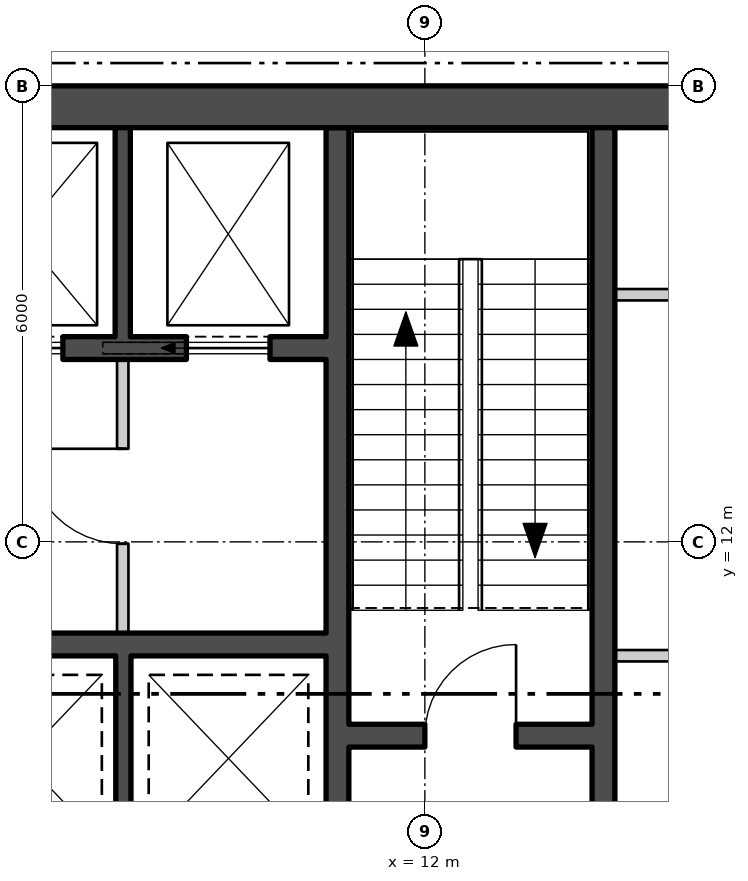
"""IFC4 building model, lengths in metres.
Left out: names, types, materials, properties, quantities, classifications, styles, units other than length and angle.
Written with IfcOpenShell. Run it as: python <this file> out.ifc"""

import sys

from ifc_helpers import new_model, si_unit, direction, frame, frame_2d, origin, place, context, subcontext, project, spatial, polyline, rectangle, outline, extrude, element, fill, save


model = new_model("IFC4")
c1 = context("Model", 3, precision=1e-05, world=origin(), true_north=direction((0.0, 1.0)))
c2 = subcontext(c1, "Body", "Model", "MODEL_VIEW")
j1 = project(units=[si_unit("LENGTHUNIT", "METRE"), si_unit("PLANEANGLEUNIT", "RADIAN")], contexts=[c1])
p1 = place(None, origin())
s1 = spatial("IfcSite", under=j1, at=p1, CompositionType="ELEMENT")
p2 = place(p1, origin())
s2 = spatial("IfcBuilding", under=s1, at=p2, CompositionType="ELEMENT")
p3 = place(p2, frame((0.0, 0.0, 124.8)))
s3 = spatial("IfcBuildingStorey", under=s2, at=p3, CompositionType="ELEMENT", Elevation=124.8)
p4 = place(p3, frame((4.58, -27.57, -0.18), z_axis=(0.0, 0.0, 1.0), x_axis=(0.500000711659, 0.866024992908, 0.0)))
e1 = element("IfcWall", 1, at=p4, inside=s3, PredefinedType="SOLIDWALL", context=c2, shape_type="SweptSolid", body=[
    extrude(outline(polyline([(-0.13, -0.225), (45.87, -0.225), (45.61, 0.225), (0.13, 0.225), (-0.13, -0.225)])), origin(), (0.0, 0.0, 1.0), 4.28),
])
p5 = place(p4, frame((1.424, 0.0, 1.08)))
e2 = element("IfcOpeningElement", 2, at=p5, cuts=e1, PredefinedType="OPENING", context=c2, shape_type="SweptSolid", body=[
    extrude(rectangle(XDim=2.4, YDim=2.6, at=frame_2d((1.2, 1.3))), frame((0.0, 0.235, 0.0), z_axis=(0.0, -1.0, 0.0), x_axis=(1.0, 0.0, 0.0)), (0.0, 0.0, 1.0), 0.47),
])
p6 = place(p4, frame((5.893, 0.0, 1.08)))
e3 = element("IfcOpeningElement", 3, at=p6, cuts=e1, PredefinedType="OPENING", context=c2, shape_type="SweptSolid", body=[
    extrude(rectangle(XDim=2.4, YDim=2.6, at=frame_2d((1.2, 1.3))), frame((0.0, 0.235, 0.0), z_axis=(0.0, -1.0, 0.0), x_axis=(1.0, 0.0, 0.0)), (0.0, 0.0, 1.0), 0.47),
])
p7 = place(p4, frame((10.401, 0.0, 1.08)))
e4 = element("IfcOpeningElement", 4, at=p7, cuts=e1, PredefinedType="OPENING", context=c2, shape_type="SweptSolid", body=[
    extrude(rectangle(XDim=2.4, YDim=2.6, at=frame_2d((1.2, 1.3))), frame((0.0, 0.235, 0.0), z_axis=(0.0, -1.0, 0.0), x_axis=(1.0, 0.0, 0.0)), (0.0, 0.0, 1.0), 0.47),
])
p8 = place(p4, frame((14.909, 0.0, 1.08)))
e5 = element("IfcOpeningElement", 5, at=p8, cuts=e1, PredefinedType="OPENING", context=c2, shape_type="SweptSolid", body=[
    extrude(rectangle(XDim=2.4, YDim=2.6, at=frame_2d((1.2, 1.3))), frame((0.0, 0.235, 0.0), z_axis=(0.0, -1.0, 0.0), x_axis=(1.0, 0.0, 0.0)), (0.0, 0.0, 1.0), 0.47),
])
p9 = place(p4, frame((19.416, 0.0, 1.08)))
e6 = element("IfcOpeningElement", 6, at=p9, cuts=e1, PredefinedType="OPENING", context=c2, shape_type="SweptSolid", body=[
    extrude(rectangle(XDim=2.4, YDim=2.6, at=frame_2d((1.2, 1.3))), frame((0.0, 0.235, 0.0), z_axis=(0.0, -1.0, 0.0), x_axis=(1.0, 0.0, 0.0)), (0.0, 0.0, 1.0), 0.47),
])
p10 = place(p4, frame((23.924, 0.0, 1.08)))
e7 = element("IfcOpeningElement", 7, at=p10, cuts=e1, PredefinedType="OPENING", context=c2, shape_type="SweptSolid", body=[
    extrude(rectangle(XDim=2.4, YDim=2.6, at=frame_2d((1.2, 1.3))), frame((0.0, 0.235, 0.0), z_axis=(0.0, -1.0, 0.0), x_axis=(1.0, 0.0, 0.0)), (0.0, 0.0, 1.0), 0.47),
])
p11 = place(p4, frame((32.939, 0.0, 1.08)))
e8 = element("IfcOpeningElement", 8, at=p11, cuts=e1, PredefinedType="OPENING", context=c2, shape_type="SweptSolid", body=[
    extrude(rectangle(XDim=2.4, YDim=2.6, at=frame_2d((1.2, 1.3))), frame((0.0, 0.235, 0.0), z_axis=(0.0, -1.0, 0.0), x_axis=(1.0, 0.0, 0.0)), (0.0, 0.0, 1.0), 0.47),
])
p12 = place(p4, frame((37.447, 0.0, 1.08)))
e9 = element("IfcOpeningElement", 9, at=p12, cuts=e1, PredefinedType="OPENING", context=c2, shape_type="SweptSolid", body=[
    extrude(rectangle(XDim=2.4, YDim=2.6, at=frame_2d((1.2, 1.3))), frame((0.0, 0.235, 0.0), z_axis=(0.0, -1.0, 0.0), x_axis=(1.0, 0.0, 0.0)), (0.0, 0.0, 1.0), 0.47),
])
p13 = place(p4, frame((41.916, 0.0, 1.08)))
e10 = element("IfcOpeningElement", 10, at=p13, cuts=e1, PredefinedType="OPENING", context=c2, shape_type="SweptSolid", body=[
    extrude(rectangle(XDim=2.4, YDim=2.6, at=frame_2d((1.2, 1.3))), frame((0.0, 0.235, 0.0), z_axis=(0.0, -1.0, 0.0), x_axis=(1.0, 0.0, 0.0)), (0.0, 0.0, 1.0), 0.47),
])
p14 = place(p3, frame((-17.5, 17.725, 0.0), z_axis=(0.0, 0.0, 1.0), x_axis=(1.0, 0.0, 0.0)))
e11 = element("IfcWall", 11, at=p14, inside=s3, PredefinedType="SHEAR", context=c2, shape_type="SweptSolid", body=[
    extrude(rectangle(XDim=35.0, YDim=0.55, at=frame_2d((17.5, 0.0))), origin(), (0.0, 0.0, 1.0), 4.3),
])
p15 = place(p3, frame((10.85, 0.55, 0.0), z_axis=(0.0, 0.0, 1.0), x_axis=(0.0, 1.0, 0.0)))
e12 = element("IfcWall", 12, at=p15, inside=s3, PredefinedType="SHEAR", context=c2, shape_type="SweptSolid", body=[
    extrude(rectangle(XDim=16.9, YDim=0.3, at=frame_2d((8.45, 0.0))), origin(), (0.0, 0.0, 1.0), 4.3),
])
p16 = place(p15, frame((5.125, 0.0, 0.0)))
e13 = element("IfcOpeningElement", 13, at=p16, cuts=e12, PredefinedType="OPENING", context=c2, shape_type="SweptSolid", body=[
    extrude(rectangle(XDim=1.25, YDim=2.1, at=frame_2d((0.625, 1.05))), frame((0.0, 0.16, 0.0), z_axis=(0.0, -1.0, 0.0), x_axis=(1.0, 0.0, 0.0)), (0.0, 0.0, 1.0), 0.32),
])
p17 = place(p15, frame((1.55, 0.0, 0.0)))
e14 = element("IfcOpeningElement", 14, at=p17, cuts=e12, PredefinedType="OPENING", context=c2, shape_type="SweptSolid", body=[
    extrude(rectangle(XDim=1.0, YDim=2.1, at=frame_2d((0.5, 1.05))), frame((0.0, 0.16, 0.0), z_axis=(0.0, -1.0, 0.0), x_axis=(1.0, 0.0, 0.0)), (0.0, 0.0, 1.0), 0.32),
])
p18 = place(p3, frame((14.35, 0.55, 0.0), z_axis=(0.0, 0.0, 1.0), x_axis=(0.0, 1.0, 0.0)))
e15 = element("IfcWall", 15, at=p18, inside=s3, PredefinedType="SHEAR", context=c2, shape_type="SweptSolid", body=[
    extrude(rectangle(XDim=16.9, YDim=0.3, at=frame_2d((8.45, 0.0))), origin(), (0.0, 0.0, 1.0), 4.3),
])
p19 = place(p18, frame((5.75, 0.0, 0.0)))
e16 = element("IfcOpeningElement", 16, at=p19, cuts=e15, PredefinedType="OPENING", context=c2, shape_type="SweptSolid", body=[
    extrude(rectangle(XDim=1.5, YDim=2.1, at=frame_2d((0.75, 1.05))), frame((0.0, 0.16, 0.0), z_axis=(0.0, -1.0, 0.0), x_axis=(1.0, 0.0, 0.0)), (0.0, 0.0, 1.0), 0.32),
])
p20 = place(p3, frame((11.0, 9.45, 0.0), z_axis=(0.0, 0.0, 1.0), x_axis=(1.0, 0.0, 0.0)))
e17 = element("IfcWall", 17, at=p20, inside=s3, PredefinedType="SHEAR", context=c2, shape_type="SweptSolid", body=[
    extrude(rectangle(XDim=3.2, YDim=0.3, at=frame_2d((1.6, 0.0))), origin(), (0.0, 0.0, 1.0), 4.3),
])
p21 = place(p20, frame((1.0, 0.0, 0.0)))
e18 = element("IfcOpeningElement", 18, at=p21, cuts=e17, PredefinedType="OPENING", context=c2, shape_type="SweptSolid", body=[
    extrude(rectangle(XDim=1.2, YDim=2.1, at=frame_2d((0.6, 1.05))), frame((0.0, 0.16, 0.0), z_axis=(0.0, -1.0, 0.0), x_axis=(1.0, 0.0, 0.0)), (0.0, 0.0, 1.0), 0.32),
])
p22 = place(p3, frame((-10.7, 14.55, 0.0), z_axis=(0.0, 0.0, 1.0), x_axis=(1.0, 0.0, 0.0)))
e19 = element("IfcWall", 19, at=p22, inside=s3, PredefinedType="SHEAR", context=c2, shape_type="SweptSolid", body=[
    extrude(rectangle(XDim=21.4, YDim=0.3, at=frame_2d((10.7, 0.0))), origin(), (0.0, 0.0, 1.0), 4.3),
])
p23 = place(p22, frame((0.738, 0.0, 0.0)))
e20 = element("IfcOpeningElement", 20, at=p23, cuts=e19, PredefinedType="OPENING", context=c2, shape_type="SweptSolid", body=[
    extrude(rectangle(XDim=1.1, YDim=2.1, at=frame_2d((0.55, 1.05))), frame((0.0, 0.16, 0.0), z_axis=(0.0, -1.0, 0.0), x_axis=(1.0, 0.0, 0.0)), (0.0, 0.0, 1.0), 0.32),
])
p24 = place(p22, frame((3.462, 0.0, 0.0)))
e21 = element("IfcOpeningElement", 21, at=p24, cuts=e19, PredefinedType="OPENING", context=c2, shape_type="SweptSolid", body=[
    extrude(rectangle(XDim=1.1, YDim=2.1, at=frame_2d((0.55, 1.05))), frame((0.0, 0.16, 0.0), z_axis=(0.0, -1.0, 0.0), x_axis=(1.0, 0.0, 0.0)), (0.0, 0.0, 1.0), 0.32),
])
p25 = place(p22, frame((6.138, 0.0, 0.0)))
e22 = element("IfcOpeningElement", 22, at=p25, cuts=e19, PredefinedType="OPENING", context=c2, shape_type="SweptSolid", body=[
    extrude(rectangle(XDim=1.1, YDim=2.1, at=frame_2d((0.55, 1.05))), frame((0.0, 0.16, 0.0), z_axis=(0.0, -1.0, 0.0), x_axis=(1.0, 0.0, 0.0)), (0.0, 0.0, 1.0), 0.32),
])
p26 = place(p22, frame((8.812, 0.0, 0.0)))
e23 = element("IfcOpeningElement", 23, at=p26, cuts=e19, PredefinedType="OPENING", context=c2, shape_type="SweptSolid", body=[
    extrude(rectangle(XDim=1.1, YDim=2.1, at=frame_2d((0.55, 1.05))), frame((0.0, 0.16, 0.0), z_axis=(0.0, -1.0, 0.0), x_axis=(1.0, 0.0, 0.0)), (0.0, 0.0, 1.0), 0.32),
])
p27 = place(p22, frame((14.162, 0.0, 0.0)))
e24 = element("IfcOpeningElement", 24, at=p27, cuts=e19, PredefinedType="OPENING", context=c2, shape_type="SweptSolid", body=[
    extrude(rectangle(XDim=1.1, YDim=2.1, at=frame_2d((0.55, 1.05))), frame((0.0, 0.16, 0.0), z_axis=(0.0, -1.0, 0.0), x_axis=(1.0, 0.0, 0.0)), (0.0, 0.0, 1.0), 0.32),
])
p28 = place(p22, frame((16.837, 0.0, 0.0)))
e25 = element("IfcOpeningElement", 25, at=p28, cuts=e19, PredefinedType="OPENING", context=c2, shape_type="SweptSolid", body=[
    extrude(rectangle(XDim=1.1, YDim=2.1, at=frame_2d((0.55, 1.05))), frame((0.0, 0.16, 0.0), z_axis=(0.0, -1.0, 0.0), x_axis=(1.0, 0.0, 0.0)), (0.0, 0.0, 1.0), 0.32),
])
p29 = place(p22, frame((19.562, 0.0, 0.0)))
e26 = element("IfcOpeningElement", 26, at=p29, cuts=e19, PredefinedType="OPENING", context=c2, shape_type="SweptSolid", body=[
    extrude(rectangle(XDim=1.1, YDim=2.1, at=frame_2d((0.55, 1.05))), frame((0.0, 0.16, 0.0), z_axis=(0.0, -1.0, 0.0), x_axis=(1.0, 0.0, 0.0)), (0.0, 0.0, 1.0), 0.32),
])
p30 = place(p3, frame((2.6, 10.65, 0.0), z_axis=(0.0, 0.0, 1.0), x_axis=(1.0, 0.0, 0.0)))
e27 = element("IfcWall", 27, at=p30, inside=s3, PredefinedType="SHEAR", context=c2, shape_type="SweptSolid", body=[
    extrude(rectangle(XDim=8.1, YDim=0.3, at=frame_2d((4.05, 0.0))), origin(), (0.0, 0.0, 1.0), 4.3),
])
p31 = place(p3, frame((8.025, 14.7, 0.0), z_axis=(0.0, 0.0, 1.0), x_axis=(0.0, 1.0, 0.0)))
e28 = element("IfcWall", 28, at=p31, inside=s3, PredefinedType="SHEAR", context=c2, shape_type="SweptSolid", body=[
    extrude(rectangle(XDim=2.75, YDim=0.2, at=frame_2d((1.375, 0.0))), origin(), (0.0, 0.0, 1.0), 4.3),
])
p32 = place(p3, frame((8.033, 7.8, 0.0), z_axis=(0.0, 0.0, 1.0), x_axis=(0.0, 1.0, 0.0)))
e29 = element("IfcWall", 29, at=p32, inside=s3, PredefinedType="SHEAR", context=c2, shape_type="SweptSolid", body=[
    extrude(rectangle(XDim=2.7, YDim=0.2, at=frame_2d((1.35, 0.0))), origin(), (0.0, 0.0, 1.0), 4.3),
])
p33 = place(p3, frame((8.025, 10.8, 0.0), z_axis=(0.0, 0.0, 1.0), x_axis=(0.0, 1.0, 0.0)))
e30 = element("IfcWall", 30, at=p33, inside=s3, PredefinedType="PARTITIONING", context=c2, shape_type="SweptSolid", body=[
    extrude(rectangle(XDim=3.6, YDim=0.15, at=frame_2d((1.8, 0.0))), origin(), (0.0, 0.0, 1.0), 4.3),
])
p34 = place(p33, frame((1.175, 0.0, 0.0)))
e31 = element("IfcOpeningElement", 31, at=p34, cuts=e30, PredefinedType="OPENING", context=c2, shape_type="SweptSolid", body=[
    extrude(rectangle(XDim=1.25, YDim=2.1, at=frame_2d((0.625, 1.05))), frame((0.0, 0.085, 0.0), z_axis=(0.0, -1.0, 0.0), x_axis=(1.0, 0.0, 0.0)), (0.0, 0.0, 1.0), 0.17),
])
for number, where, z_axis, x_axis in (
    (32, (14.5, 10.502, 0.0), (0.0, 0.0, 1.0), (1.0, 0.0, 0.0)),
    (33, (14.5, 15.252, 0.0), (0.0, 0.0, 1.0), (1.0, 0.0, 0.0)),
):
    element("IfcWall", number, at=place(p3, frame(where, z_axis=z_axis, x_axis=x_axis)), inside=s3, PredefinedType="PARTITIONING", context=c2, shape_type="SweptSolid", body=[
        extrude(rectangle(XDim=2.45, YDim=0.15, at=frame_2d((1.225, 0.0))), origin(), (0.0, 0.0, 1.0), 4.3),
    ])
p35 = place(p28, origin())
e34 = element("IfcDoor", 34, at=p35, inside=s3, OperationType="SLIDING_TO_LEFT", PredefinedType="DOOR", context=c2, shape_type="SweptSolid", body=[
    extrude(rectangle(XDim=1.1, YDim=2.1, at=frame_2d((0.55, 1.05))), frame((0.0, 0.025, 0.0), z_axis=(0.0, -1.0, 0.0), x_axis=(1.0, 0.0, 0.0)), (0.0, 0.0, 1.0), 0.05),
])
fill(e25, e34)
p36 = place(p29, origin())
e35 = element("IfcDoor", 35, at=p36, inside=s3, OperationType="SLIDING_TO_LEFT", PredefinedType="DOOR", context=c2, shape_type="SweptSolid", body=[
    extrude(rectangle(XDim=1.1, YDim=2.1, at=frame_2d((0.55, 1.05))), frame((0.0, 0.025, 0.0), z_axis=(0.0, -1.0, 0.0), x_axis=(1.0, 0.0, 0.0)), (0.0, 0.0, 1.0), 0.05),
])
fill(e26, e35)
p37 = place(p34, origin())
e36 = element("IfcDoor", 36, at=p37, inside=s3, OperationType="SINGLE_SWING_LEFT", PredefinedType="DOOR", context=c2, shape_type="SweptSolid", body=[
    extrude(rectangle(XDim=1.25, YDim=2.1, at=frame_2d((0.625, 1.05))), frame((0.0, 0.025, 0.0), z_axis=(0.0, -1.0, 0.0), x_axis=(1.0, 0.0, 0.0)), (0.0, 0.0, 1.0), 0.05),
])
fill(e31, e36)
p38 = place(p21, origin())
e37 = element("IfcDoor", 37, at=p38, inside=s3, OperationType="SINGLE_SWING_LEFT", PredefinedType="DOOR", context=c2, shape_type="SweptSolid", body=[
    extrude(rectangle(XDim=1.2, YDim=2.1, at=frame_2d((0.6, 1.05))), frame((0.0, 0.025, 0.0), z_axis=(0.0, -1.0, 0.0), x_axis=(1.0, 0.0, 0.0)), (0.0, 0.0, 1.0), 0.05),
])
fill(e18, e37)
save(model, sys.argv[1])
